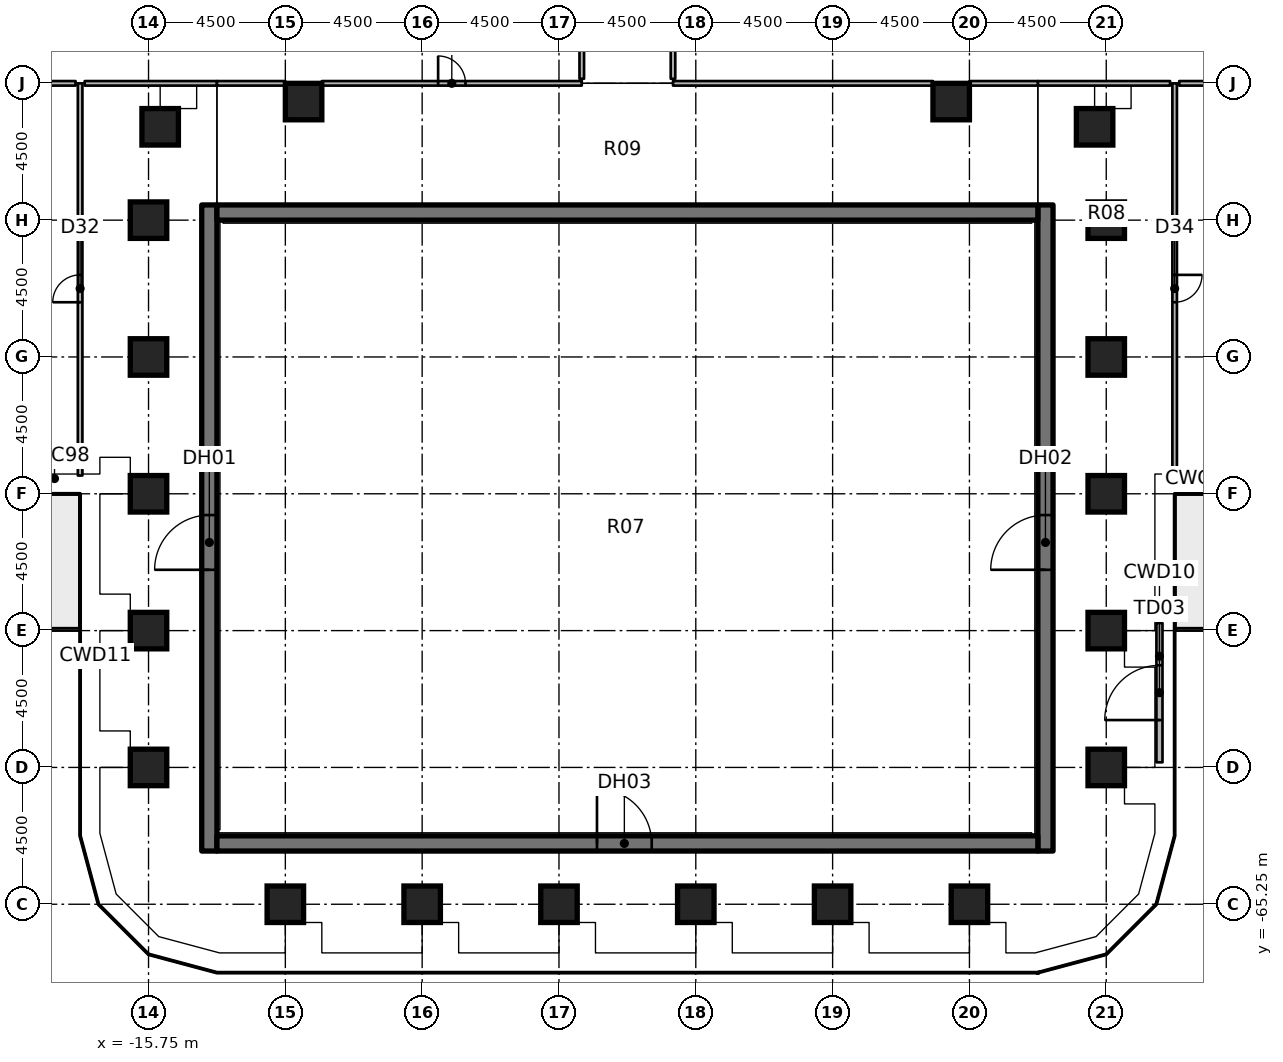
"""IFC4 building model, lengths in metres.
Left out: names, types, materials, properties, quantities, classifications, styles, units other than length and angle.
Written with IfcOpenShell. Run it as: python <this file> out.ifc"""

import sys

from ifc_helpers import new_model, si_unit, direction, frame, frame_2d, origin, origin_2d, place, context, subcontext, project, spatial, rectangle, extrude, element, fill, save


model = new_model("IFC4")
c1 = context("Model", 3, precision=1e-05, world=origin(), true_north=direction((0.0, 1.0)))
c2 = subcontext(c1, "Body", "Model", "MODEL_VIEW")
j1 = project(units=[si_unit("LENGTHUNIT", "METRE"), si_unit("PLANEANGLEUNIT", "RADIAN")], contexts=[c1])
p1 = place(None, origin())
s1 = spatial("IfcSite", under=j1, at=p1, CompositionType="ELEMENT")
p2 = place(p1, origin())
s2 = spatial("IfcBuilding", under=s1, at=p2, CompositionType="ELEMENT")
p3 = place(p2, frame((0.0, 0.0, 7.0)))
s3 = spatial("IfcBuildingStorey", under=s2, at=p3, CompositionType="ELEMENT", Elevation=7.0)
for number, where, z_axis, x_axis in (
    (1, (-15.75, -60.75, 0.0), (0.0, 0.0, 1.0), (1.0, 0.0, 0.0)),
    (2, (-15.75, -56.25, 0.0), (0.0, 0.0, 1.0), (1.0, 0.0, 0.0)),
    (3, (-15.75, -51.75, 0.0), (0.0, 0.0, 1.0), (1.0, 0.0, 0.0)),
    (4, (-15.75, -47.25, 0.0), (0.0, 0.0, 1.0), (1.0, 0.0, 0.0)),
    (5, (-15.75, -42.75, 0.0), (0.0, 0.0, 1.0), (1.0, 0.0, 0.0)),
    (6, (-15.367, -39.68, 0.0), (0.0, 0.0, 1.0), (1.0, 0.0, 0.0)),
    (7, (-11.25, -65.25, 0.0), (0.0, 0.0, 1.0), (1.0, 0.0, 0.0)),
    (8, (-10.65, -38.85, 0.0), (0.0, 0.0, 1.0), (1.0, 0.0, 0.0)),
    (9, (-6.75, -65.25, 0.0), (0.0, 0.0, 1.0), (1.0, 0.0, 0.0)),
    (10, (-2.25, -65.25, 0.0), (0.0, 0.0, 1.0), (1.0, 0.0, 0.0)),
    (11, (2.25, -65.25, 0.0), (0.0, 0.0, 1.0), (1.0, 0.0, 0.0)),
    (12, (6.75, -65.25, 0.0), (0.0, 0.0, 1.0), (1.0, 0.0, 0.0)),
    (13, (11.25, -65.25, 0.0), (0.0, 0.0, 1.0), (1.0, 0.0, 0.0)),
    (14, (10.65, -38.85, 0.0), (0.0, 0.0, 1.0), (1.0, 0.0, 0.0)),
    (15, (15.75, -60.75, 0.0), (0.0, 0.0, 1.0), (1.0, 0.0, 0.0)),
    (16, (15.75, -56.25, 0.0), (0.0, 0.0, 1.0), (1.0, 0.0, 0.0)),
    (17, (15.75, -51.75, 0.0), (0.0, 0.0, 1.0), (1.0, 0.0, 0.0)),
    (18, (15.75, -47.25, 0.0), (0.0, 0.0, 1.0), (1.0, 0.0, 0.0)),
    (19, (15.75, -42.75, 0.0), (0.0, 0.0, 1.0), (1.0, 0.0, 0.0)),
    (20, (15.367, -39.68, 0.0), (0.0, 0.0, 1.0), (1.0, 0.0, 0.0)),
):
    element("IfcColumn", number, at=place(p3, frame(where, z_axis=z_axis, x_axis=x_axis)), inside=s3, PredefinedType="COLUMN", context=c2, shape_type="SweptSolid", body=[
        extrude(rectangle(XDim=1.2, YDim=1.2, at=origin_2d()), origin(), (0.0, 0.0, 1.0), 4.55),
    ])
p4 = place(p3, frame((-13.75, -63.5, 0.0), z_axis=(0.0, 0.0, 1.0), x_axis=(0.0, 1.0, 0.0)))
e21 = element("IfcWall", 21, at=p4, inside=s3, PredefinedType="SOLIDWALL", context=c2, shape_type="SweptSolid", body=[
    extrude(rectangle(XDim=21.25, YDim=0.5, at=frame_2d((10.625, 0.0))), origin(), (0.0, 0.0, 1.0), 5.0),
])
p5 = place(p4, frame((9.25, 0.0, 0.0)))
e22 = element("IfcOpeningElement", 22, at=p5, cuts=e21, PredefinedType="OPENING", context=c2, shape_type="SweptSolid", body=[
    extrude(rectangle(XDim=1.8, YDim=2.1, at=frame_2d((0.9, 1.05))), frame((0.0, 0.26, 0.0), z_axis=(0.0, -1.0, 0.0), x_axis=(1.0, 0.0, 0.0)), (0.0, 0.0, 1.0), 0.52),
])
p6 = place(p3, frame((13.75, -63.5, 0.0), z_axis=(0.0, 0.0, 1.0), x_axis=(0.0, 1.0, 0.0)))
e23 = element("IfcWall", 23, at=p6, inside=s3, PredefinedType="SOLIDWALL", context=c2, shape_type="SweptSolid", body=[
    extrude(rectangle(XDim=21.25, YDim=0.5, at=frame_2d((10.625, 0.0))), origin(), (0.0, 0.0, 1.0), 5.0),
])
p7 = place(p6, frame((9.25, 0.0, 0.0)))
e24 = element("IfcOpeningElement", 24, at=p7, cuts=e23, PredefinedType="OPENING", context=c2, shape_type="SweptSolid", body=[
    extrude(rectangle(XDim=1.8, YDim=2.1, at=frame_2d((0.9, 1.05))), frame((0.0, 0.26, 0.0), z_axis=(0.0, -1.0, 0.0), x_axis=(1.0, 0.0, 0.0)), (0.0, 0.0, 1.0), 0.52),
])
p8 = place(p3, frame((-13.5, -63.25, 0.0), z_axis=(0.0, 0.0, 1.0), x_axis=(1.0, 0.0, 0.0)))
e25 = element("IfcWall", 25, at=p8, inside=s3, PredefinedType="SOLIDWALL", context=c2, shape_type="SweptSolid", body=[
    extrude(rectangle(XDim=27.0, YDim=0.5, at=frame_2d((13.5, 0.0))), origin(), (0.0, 0.0, 1.0), 5.0),
])
p9 = place(p8, frame((12.5, 0.0, 0.0)))
e26 = element("IfcOpeningElement", 26, at=p9, cuts=e25, PredefinedType="OPENING", context=c2, shape_type="SweptSolid", body=[
    extrude(rectangle(XDim=1.8, YDim=2.1, at=frame_2d((0.9, 1.05))), frame((0.0, 0.26, 0.0), z_axis=(0.0, -1.0, 0.0), x_axis=(1.0, 0.0, 0.0)), (0.0, 0.0, 1.0), 0.52),
])
p10 = place(p3, frame((-13.5, -42.5, 0.0), z_axis=(0.0, 0.0, 1.0), x_axis=(1.0, 0.0, 0.0)))
e27 = element("IfcWall", 27, at=p10, inside=s3, PredefinedType="SOLIDWALL", context=c2, shape_type="SweptSolid", body=[
    extrude(rectangle(XDim=27.0, YDim=0.5, at=frame_2d((13.5, 0.0))), origin(), (0.0, 0.0, 1.0), 5.0),
])
p11 = place(p3, frame((17.5, -60.582, 0.0), z_axis=(0.0, 0.0, 1.0), x_axis=(0.0, 1.0, 0.0)))
e28 = element("IfcWall", 28, at=p11, inside=s3, PredefinedType="SOLIDWALL", context=c2, shape_type="SweptSolid", body=[
    extrude(rectangle(XDim=4.58, YDim=0.2, at=frame_2d((2.29, 0.0))), origin(), (0.0, 0.0, 1.0), 4.55),
])
p12 = place(p11, frame((1.39, 0.0, 0.0)))
e29 = element("IfcOpeningElement", 29, at=p12, cuts=e28, PredefinedType="OPENING", context=c2, shape_type="SweptSolid", body=[
    extrude(rectangle(XDim=1.8, YDim=2.4, at=frame_2d((0.9, 1.2))), frame((0.0, 0.11, 0.0), z_axis=(0.0, -1.0, 0.0), x_axis=(1.0, 0.0, 0.0)), (0.0, 0.0, 1.0), 0.22),
])
p13 = place(p3, frame((-18.0, -51.15, 0.0), z_axis=(0.0, 0.0, 1.0), x_axis=(0.0, 1.0, 0.0)))
e30 = element("IfcWall", 30, at=p13, inside=s3, PredefinedType="PARTITIONING", context=c2, shape_type="SweptSolid", body=[
    extrude(rectangle(XDim=12.9, YDim=0.15, at=frame_2d((6.45, 0.0))), origin(), (0.0, 0.0, 1.0), 4.55),
])
p14 = place(p13, frame((5.7, 0.0, 0.0)))
e31 = element("IfcOpeningElement", 31, at=p14, cuts=e30, PredefinedType="OPENING", context=c2, shape_type="SweptSolid", body=[
    extrude(rectangle(XDim=0.9, YDim=2.1, at=frame_2d((0.45, 1.05))), frame((0.0, 0.085, 0.0), z_axis=(0.0, -1.0, 0.0), x_axis=(1.0, 0.0, 0.0)), (0.0, 0.0, 1.0), 0.17),
])
p15 = place(p3, frame((18.0, -38.25, 0.0), z_axis=(0.0, 0.0, 1.0), x_axis=(0.0, -1.0, 0.0)))
e32 = element("IfcWall", 32, at=p15, inside=s3, PredefinedType="PARTITIONING", context=c2, shape_type="SweptSolid", body=[
    extrude(rectangle(XDim=12.9, YDim=0.15, at=frame_2d((6.45, 0.0))), origin(), (0.0, 0.0, 1.0), 4.55),
])
p16 = place(p15, frame((6.3, 0.0, 0.0)))
e33 = element("IfcOpeningElement", 33, at=p16, cuts=e32, PredefinedType="OPENING", context=c2, shape_type="SweptSolid", body=[
    extrude(rectangle(XDim=0.9, YDim=2.1, at=frame_2d((0.45, 1.05))), frame((0.0, 0.085, 0.0), z_axis=(0.0, -1.0, 0.0), x_axis=(1.0, 0.0, 0.0)), (0.0, 0.0, 1.0), 0.17),
])
for number, where, z_axis, x_axis in (
    (34, (13.5, -38.25, 0.0), (0.0, 0.0, 1.0), (1.0, 0.0, 0.0)),
    (35, (-17.85, -38.25, 0.0), (0.0, 0.0, 1.0), (1.0, 0.0, 0.0)),
):
    element("IfcWall", number, at=place(p3, frame(where, z_axis=z_axis, x_axis=x_axis)), inside=s3, PredefinedType="PARTITIONING", context=c2, shape_type="SweptSolid", body=[
        extrude(rectangle(XDim=4.35, YDim=0.15, at=frame_2d((2.175, 0.0))), origin(), (0.0, 0.0, 1.0), 4.55),
    ])
p17 = place(p3, frame((1.5, -38.25, 0.0), z_axis=(0.0, 0.0, 1.0), x_axis=(1.0, 0.0, 0.0)))
e36 = element("IfcWall", 36, at=p17, inside=s3, PredefinedType="PARTITIONING", context=c2, shape_type="SweptSolid", body=[
    extrude(rectangle(XDim=8.55, YDim=0.15, at=frame_2d((4.275, 0.0))), origin(), (0.0, 0.0, 1.0), 4.55),
])
for number, where, z_axis, x_axis in (
    (37, (11.25, -38.25, 0.0), (0.0, 0.0, 1.0), (1.0, 0.0, 0.0)),
    (38, (-13.5, -38.25, 0.0), (0.0, 0.0, 1.0), (1.0, 0.0, 0.0)),
):
    element("IfcWall", number, at=place(p3, frame(where, z_axis=z_axis, x_axis=x_axis)), inside=s3, PredefinedType="PARTITIONING", context=c2, shape_type="SweptSolid", body=[
        extrude(rectangle(XDim=2.25, YDim=0.15, at=frame_2d((1.125, 0.0))), origin(), (0.0, 0.0, 1.0), 4.55),
    ])
p18 = place(p3, frame((-10.05, -38.25, 0.0), z_axis=(0.0, 0.0, 1.0), x_axis=(1.0, 0.0, 0.0)))
e39 = element("IfcWall", 39, at=p18, inside=s3, PredefinedType="PARTITIONING", context=c2, shape_type="SweptSolid", body=[
    extrude(rectangle(XDim=8.55, YDim=0.15, at=frame_2d((4.275, 0.0))), origin(), (0.0, 0.0, 1.0), 4.55),
])
p19 = place(p18, frame((3.825, 0.0, 0.0)))
e40 = element("IfcOpeningElement", 40, at=p19, cuts=e39, PredefinedType="OPENING", context=c2, shape_type="SweptSolid", body=[
    extrude(rectangle(XDim=0.9, YDim=2.1, at=frame_2d((0.45, 1.05))), frame((0.0, 0.085, 0.0), z_axis=(0.0, -1.0, 0.0), x_axis=(1.0, 0.0, 0.0)), (0.0, 0.0, 1.0), 0.17),
])
p20 = place(p3, frame((-23.55, -38.25, 0.0), z_axis=(0.0, 0.0, 1.0), x_axis=(1.0, 0.0, 0.0)))
e41 = element("IfcWall", 41, at=p20, inside=s3, PredefinedType="PARTITIONING", context=c2, shape_type="SweptSolid", body=[
    extrude(rectangle(XDim=5.4, YDim=0.15, at=frame_2d((2.7, 0.0))), origin(), (0.0, 0.0, 1.0), 4.55),
])
p21 = place(p3, frame((18.15, -38.25, 0.0), z_axis=(0.0, 0.0, 1.0), x_axis=(1.0, 0.0, 0.0)))
e42 = element("IfcWall", 42, at=p21, inside=s3, PredefinedType="PARTITIONING", context=c2, shape_type="SweptSolid", body=[
    extrude(rectangle(XDim=6.0, YDim=0.15, at=frame_2d((3.0, 0.0))), origin(), (0.0, 0.0, 1.0), 4.55),
])
for number, where, z_axis, x_axis in (
    (43, (1.5, -32.4, 0.0), (0.0, 0.0, 1.0), (0.0, -1.0, 0.0)),
    (44, (-1.5, -38.1, 0.0), (0.0, 0.0, 1.0), (0.0, 1.0, 0.0)),
):
    element("IfcWall", number, at=place(p3, frame(where, z_axis=z_axis, x_axis=x_axis)), inside=s3, PredefinedType="PARTITIONING", context=c2, shape_type="SweptSolid", body=[
        extrude(rectangle(XDim=5.7, YDim=0.15, at=frame_2d((2.85, 0.0))), origin(), (0.0, 0.0, 1.0), 4.55),
    ])
p22 = place(p12, origin())
e45 = element("IfcDoor", 45, at=p22, inside=s3, OperationType="SINGLE_SWING_LEFT", PredefinedType="DOOR", context=c2, shape_type="SweptSolid", body=[
    extrude(rectangle(XDim=1.8, YDim=2.4, at=frame_2d((0.9, 1.2))), frame((0.0, 0.025, 0.0), z_axis=(0.0, -1.0, 0.0), x_axis=(1.0, 0.0, 0.0)), (0.0, 0.0, 1.0), 0.05),
])
fill(e29, e45)
p23 = place(p14, origin())
e46 = element("IfcDoor", 46, at=p23, inside=s3, OperationType="SINGLE_SWING_LEFT", PredefinedType="DOOR", context=c2, shape_type="SweptSolid", body=[
    extrude(rectangle(XDim=0.9, YDim=2.1, at=frame_2d((0.45, 1.05))), frame((0.0, 0.025, 0.0), z_axis=(0.0, -1.0, 0.0), x_axis=(1.0, 0.0, 0.0)), (0.0, 0.0, 1.0), 0.05),
])
fill(e31, e46)
p24 = place(p16, origin())
e47 = element("IfcDoor", 47, at=p24, inside=s3, OperationType="SINGLE_SWING_LEFT", PredefinedType="DOOR", context=c2, shape_type="SweptSolid", body=[
    extrude(rectangle(XDim=0.9, YDim=2.1, at=frame_2d((0.45, 1.05))), frame((0.0, 0.025, 0.0), z_axis=(0.0, -1.0, 0.0), x_axis=(1.0, 0.0, 0.0)), (0.0, 0.0, 1.0), 0.05),
])
fill(e33, e47)
p25 = place(p19, origin())
e48 = element("IfcDoor", 48, at=p25, inside=s3, OperationType="SINGLE_SWING_LEFT", PredefinedType="DOOR", context=c2, shape_type="SweptSolid", body=[
    extrude(rectangle(XDim=0.9, YDim=2.1, at=frame_2d((0.45, 1.05))), frame((0.0, 0.025, 0.0), z_axis=(0.0, -1.0, 0.0), x_axis=(1.0, 0.0, 0.0)), (0.0, 0.0, 1.0), 0.05),
])
fill(e40, e48)
p26 = place(p5, origin())
e49 = element("IfcDoor", 49, at=p26, inside=s3, OperationType="DOUBLE_DOOR_DOUBLE_SWING", PredefinedType="DOOR", context=c2, shape_type="SweptSolid", body=[
    extrude(rectangle(XDim=1.8, YDim=2.1, at=frame_2d((0.9, 1.05))), frame((0.0, 0.025, 0.0), z_axis=(0.0, -1.0, 0.0), x_axis=(1.0, 0.0, 0.0)), (0.0, 0.0, 1.0), 0.05),
])
fill(e22, e49)
p27 = place(p7, origin())
e50 = element("IfcDoor", 50, at=p27, inside=s3, OperationType="DOUBLE_DOOR_DOUBLE_SWING", PredefinedType="DOOR", context=c2, shape_type="SweptSolid", body=[
    extrude(rectangle(XDim=1.8, YDim=2.1, at=frame_2d((0.9, 1.05))), frame((0.0, 0.025, 0.0), z_axis=(0.0, -1.0, 0.0), x_axis=(1.0, 0.0, 0.0)), (0.0, 0.0, 1.0), 0.05),
])
fill(e24, e50)
p28 = place(p9, origin())
e51 = element("IfcDoor", 51, at=p28, inside=s3, OperationType="DOUBLE_DOOR_DOUBLE_SWING", PredefinedType="DOOR", context=c2, shape_type="SweptSolid", body=[
    extrude(rectangle(XDim=1.8, YDim=2.1, at=frame_2d((0.9, 1.05))), frame((0.0, 0.025, 0.0), z_axis=(0.0, -1.0, 0.0), x_axis=(1.0, 0.0, 0.0)), (0.0, 0.0, 1.0), 0.05),
])
fill(e26, e51)
save(model, sys.argv[1])
